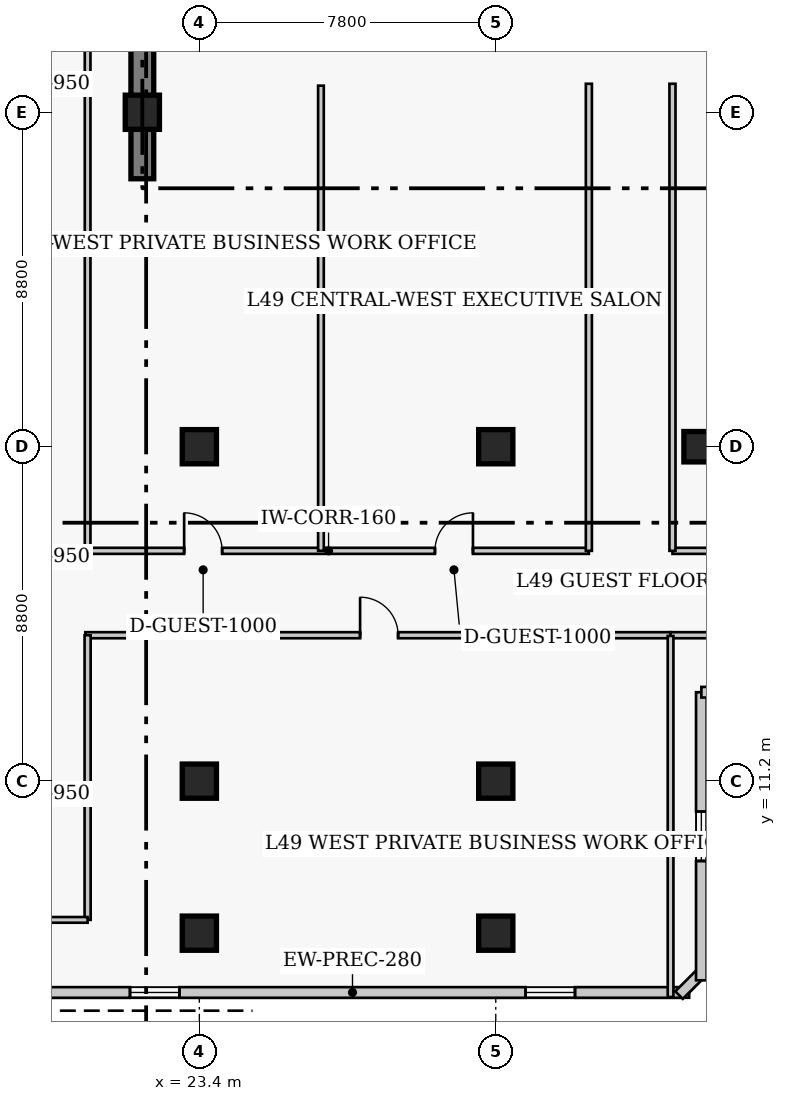
"""IFC4 building model, lengths in metres.
Left out: names, types, materials, properties, quantities, classifications, styles, units other than length and angle.
Written with IfcOpenShell. Run it as: python <this file> out.ifc"""

import sys

from ifc_helpers import new_model, si_unit, direction, frame, frame_2d, origin, origin_2d, place, context, subcontext, project, spatial, rectangle, extrude, element, fill, save


model = new_model("IFC4")
c1 = context("Model", 3, precision=1e-05, world=origin(), true_north=direction((0.0, 1.0)))
c2 = subcontext(c1, "Body", "Model", "MODEL_VIEW")
j1 = project(units=[si_unit("LENGTHUNIT", "METRE"), si_unit("PLANEANGLEUNIT", "RADIAN")], contexts=[c1])
p1 = place(None, origin())
s1 = spatial("IfcSite", under=j1, at=p1, CompositionType="ELEMENT")
p2 = place(p1, origin())
s2 = spatial("IfcBuilding", under=s1, at=p2, CompositionType="ELEMENT")
p3 = place(p2, frame((0.0, 0.0, 196.8)))
s3 = spatial("IfcBuildingStorey", under=s2, at=p3, CompositionType="ELEMENT", Elevation=196.8)
p4 = place(p3, frame((21.9, 27.05, 0.0), z_axis=(0.0, 0.0, 1.0), x_axis=(0.0, 1.0, 0.0)))
e1 = element("IfcWall", 1, at=p4, inside=s3, PredefinedType="SHEAR", context=c2, shape_type="SweptSolid", body=[
    extrude(rectangle(XDim=13.57, YDim=0.6, at=frame_2d((6.785, 0.0))), origin(), (0.0, 0.0, 1.0), 3.9),
])
for number, where, z_axis, x_axis in (
    (2, (23.4, 11.2, 0.0), (0.0, 0.0, 1.0), (1.0, 0.0, 0.0)),
    (3, (23.4, 20.0, 0.0), (0.0, 0.0, 1.0), (1.0, 0.0, 0.0)),
    (4, (31.2, 11.2, 0.0), (0.0, 0.0, 1.0), (1.0, 0.0, 0.0)),
    (5, (31.2, 20.0, 0.0), (0.0, 0.0, 1.0), (1.0, 0.0, 0.0)),
):
    element("IfcColumn", number, at=place(p3, frame(where, z_axis=z_axis, x_axis=x_axis)), inside=s3, PredefinedType="COLUMN", context=c2, shape_type="SweptSolid", body=[
        extrude(rectangle(XDim=0.9, YDim=0.9, at=origin_2d()), origin(), (0.0, 0.0, 1.0), 3.9),
    ])
p5 = place(p3, frame((36.75, 20.0, 0.0), z_axis=(0.0, 0.0, 1.0), x_axis=(1.0, 0.0, 0.0)))
e6 = element("IfcColumn", 6, at=p5, inside=s3, PredefinedType="COLUMN", context=c2, shape_type="SweptSolid", body=[
    extrude(rectangle(XDim=1.2, YDim=0.8, at=origin_2d()), origin(), (0.0, 0.0, 1.0), 3.9),
])
for number, where, z_axis, x_axis in (
    (7, (21.9, 28.8, 0.0), (0.0, 0.0, 1.0), (1.0, 0.0, 0.0)),
    (8, (23.4, 7.2, 0.0), (0.0, 0.0, 1.0), (1.0, 0.0, 0.0)),
    (9, (31.2, 7.2, 0.0), (0.0, 0.0, 1.0), (1.0, 0.0, 0.0)),
):
    element("IfcColumn", number, at=place(p3, frame(where, z_axis=z_axis, x_axis=x_axis)), inside=s3, PredefinedType="COLUMN", context=c2, shape_type="SweptSolid", body=[
        extrude(rectangle(XDim=0.9, YDim=0.9, at=origin_2d()), origin(), (0.0, 0.0, 1.0), 3.9),
    ])
p6 = place(p3, frame((10.46, 5.64, 0.0), z_axis=(0.0, 0.0, 1.0), x_axis=(1.0, 0.0, 0.0)))
e10 = element("IfcWall", 10, at=p6, inside=s3, PredefinedType="SOLIDWALL", context=c2, shape_type="SweptSolid", body=[
    extrude(rectangle(XDim=25.83, YDim=0.28, at=frame_2d((12.915, 0.0))), origin(), (0.0, 0.0, 1.0), 3.65),
])
p7 = place(p6, frame((4.305, 0.0, 0.85)))
e11 = element("IfcOpeningElement", 11, at=p7, cuts=e10, PredefinedType="OPENING", context=c2, shape_type="SweptSolid", body=[
    extrude(rectangle(XDim=1.3, YDim=1.7, at=frame_2d((0.65, 0.85))), frame((0.0, 0.15, 0.0), z_axis=(0.0, -1.0, 0.0), x_axis=(1.0, 0.0, 0.0)), (0.0, 0.0, 1.0), 0.3),
])
p8 = place(p6, frame((11.115, 0.0, 0.85)))
e12 = element("IfcOpeningElement", 12, at=p8, cuts=e10, PredefinedType="OPENING", context=c2, shape_type="SweptSolid", body=[
    extrude(rectangle(XDim=1.3, YDim=1.7, at=frame_2d((0.65, 0.85))), frame((0.0, 0.15, 0.0), z_axis=(0.0, -1.0, 0.0), x_axis=(1.0, 0.0, 0.0)), (0.0, 0.0, 1.0), 0.3),
])
p9 = place(p6, frame((21.525, 0.0, 0.85)))
e13 = element("IfcOpeningElement", 13, at=p9, cuts=e10, PredefinedType="OPENING", context=c2, shape_type="SweptSolid", body=[
    extrude(rectangle(XDim=1.3, YDim=1.7, at=frame_2d((0.65, 0.85))), frame((0.0, 0.15, 0.0), z_axis=(0.0, -1.0, 0.0), x_axis=(1.0, 0.0, 0.0)), (0.0, 0.0, 1.0), 0.3),
])
p10 = place(p3, frame((36.023, 5.571, 0.0), z_axis=(0.0, 0.0, 1.0), x_axis=(0.707106781187, 0.707106781187, 0.0)))
e14 = element("IfcWall", 14, at=p10, inside=s3, PredefinedType="SOLIDWALL", context=c2, shape_type="SweptSolid", body=[
    extrude(rectangle(XDim=0.928, YDim=0.28, at=frame_2d((0.464, 0.0))), origin(), (0.0, 0.0, 1.0), 3.65),
])
p11 = place(p3, frame((36.61, 5.96, 0.0), z_axis=(0.0, 0.0, 1.0), x_axis=(0.0, 1.0, 0.0)))
e15 = element("IfcWall", 15, at=p11, inside=s3, PredefinedType="SOLIDWALL", context=c2, shape_type="SweptSolid", body=[
    extrude(rectangle(XDim=7.58, YDim=0.28, at=frame_2d((3.79, 0.0))), origin(), (0.0, 0.0, 1.0), 3.65),
])
p12 = place(p11, frame((3.14, 0.0, 0.85)))
e16 = element("IfcOpeningElement", 16, at=p12, cuts=e15, PredefinedType="OPENING", context=c2, shape_type="SweptSolid", body=[
    extrude(rectangle(XDim=1.3, YDim=1.7, at=frame_2d((0.65, 0.85))), frame((0.0, 0.15, 0.0), z_axis=(0.0, -1.0, 0.0), x_axis=(1.0, 0.0, 0.0)), (0.0, 0.0, 1.0), 0.3),
])
p13 = place(p3, frame((36.61, 13.54, 0.0), z_axis=(0.0, 0.0, 1.0), x_axis=(1.0, 0.0, 0.0)))
e17 = element("IfcWall", 17, at=p13, inside=s3, PredefinedType="SOLIDWALL", context=c2, shape_type="SweptSolid", body=[
    extrude(rectangle(XDim=4.78, YDim=0.28, at=frame_2d((2.39, 0.0))), origin(), (0.0, 0.0, 1.0), 3.65),
])
p14 = place(p13, frame((1.74, 0.0, 0.85)))
e18 = element("IfcOpeningElement", 18, at=p14, cuts=e17, PredefinedType="OPENING", context=c2, shape_type="SweptSolid", body=[
    extrude(rectangle(XDim=1.3, YDim=1.7, at=frame_2d((0.65, 0.85))), frame((0.0, 0.15, 0.0), z_axis=(0.0, -1.0, 0.0), x_axis=(1.0, 0.0, 0.0)), (0.0, 0.0, 1.0), 0.3),
])
p15 = place(p3, frame((20.4, 17.26, 0.0), z_axis=(0.0, 0.0, 1.0), x_axis=(1.0, 0.0, 0.0)))
e19 = element("IfcWall", 19, at=p15, inside=s3, PredefinedType="PARTITIONING", context=c2, shape_type="SweptSolid", body=[
    extrude(rectangle(XDim=13.25, YDim=0.16, at=frame_2d((6.625, 0.0))), origin(), (0.0, 0.0, 1.0), 3.65),
])
p16 = place(p15, frame((2.6, 0.0, 0.0)))
e20 = element("IfcOpeningElement", 20, at=p16, cuts=e19, PredefinedType="OPENING", context=c2, shape_type="SweptSolid", body=[
    extrude(rectangle(XDim=1.0, YDim=2.15, at=frame_2d((0.5, 1.075))), frame((0.0, 0.09, 0.0), z_axis=(0.0, -1.0, 0.0), x_axis=(1.0, 0.0, 0.0)), (0.0, 0.0, 1.0), 0.18),
])
p17 = place(p15, frame((9.2, 0.0, 0.0)))
e21 = element("IfcOpeningElement", 21, at=p17, cuts=e19, PredefinedType="OPENING", context=c2, shape_type="SweptSolid", body=[
    extrude(rectangle(XDim=1.0, YDim=2.15, at=frame_2d((0.5, 1.075))), frame((0.0, 0.09, 0.0), z_axis=(0.0, -1.0, 0.0), x_axis=(1.0, 0.0, 0.0)), (0.0, 0.0, 1.0), 0.18),
])
p18 = place(p3, frame((35.85, 17.26, 0.0), z_axis=(0.0, 0.0, 1.0), x_axis=(1.0, 0.0, 0.0)))
e22 = element("IfcWall", 22, at=p18, inside=s3, PredefinedType="PARTITIONING", context=c2, shape_type="SweptSolid", body=[
    extrude(rectangle(XDim=23.35, YDim=0.16, at=frame_2d((11.675, 0.0))), origin(), (0.0, 0.0, 1.0), 3.65),
])
p19 = place(p18, frame((8.95, 0.0, 0.0)))
e23 = element("IfcOpeningElement", 23, at=p19, cuts=e22, PredefinedType="OPENING", context=c2, shape_type="SweptSolid", body=[
    extrude(rectangle(XDim=1.0, YDim=2.15, at=frame_2d((0.5, 1.075))), frame((0.0, 0.09, 0.0), z_axis=(0.0, -1.0, 0.0), x_axis=(1.0, 0.0, 0.0)), (0.0, 0.0, 1.0), 0.18),
])
p20 = place(p18, frame((17.625, 0.0, 0.0)))
e24 = element("IfcOpeningElement", 24, at=p20, cuts=e22, PredefinedType="OPENING", context=c2, shape_type="SweptSolid", body=[
    extrude(rectangle(XDim=1.0, YDim=2.15, at=frame_2d((0.5, 1.075))), frame((0.0, 0.09, 0.0), z_axis=(0.0, -1.0, 0.0), x_axis=(1.0, 0.0, 0.0)), (0.0, 0.0, 1.0), 0.18),
])
for number, where, z_axis, x_axis in (
    (25, (33.65, 17.26, 0.0), (0.0, 0.0, 1.0), (0.0, 1.0, 0.0)),
    (26, (35.85, 17.26, 0.0), (0.0, 0.0, 1.0), (0.0, 1.0, 0.0)),
):
    element("IfcWall", number, at=place(p3, frame(where, z_axis=z_axis, x_axis=x_axis)), inside=s3, PredefinedType="PARTITIONING", context=c2, shape_type="SweptSolid", body=[
        extrude(rectangle(XDim=12.29, YDim=0.16, at=frame_2d((6.145, 0.0))), origin(), (0.0, 0.0, 1.0), 3.65),
    ])
p21 = place(p3, frame((20.4, 15.04, 0.0), z_axis=(0.0, 0.0, 1.0), x_axis=(1.0, 0.0, 0.0)))
e27 = element("IfcWall", 27, at=p21, inside=s3, PredefinedType="PARTITIONING", context=c2, shape_type="SweptSolid", body=[
    extrude(rectangle(XDim=15.4, YDim=0.16, at=frame_2d((7.7, 0.0))), origin(), (0.0, 0.0, 1.0), 3.65),
])
p22 = place(p21, frame((7.23, 0.0, 0.0)))
e28 = element("IfcOpeningElement", 28, at=p22, cuts=e27, PredefinedType="OPENING", context=c2, shape_type="SweptSolid", body=[
    extrude(rectangle(XDim=1.0, YDim=2.15, at=frame_2d((0.5, 1.075))), frame((0.0, 0.09, 0.0), z_axis=(0.0, -1.0, 0.0), x_axis=(1.0, 0.0, 0.0)), (0.0, 0.0, 1.0), 0.18),
])
p23 = place(p3, frame((35.8, 15.04, 0.0), z_axis=(0.0, 0.0, 1.0), x_axis=(1.0, 0.0, 0.0)))
e29 = element("IfcWall", 29, at=p23, inside=s3, PredefinedType="PARTITIONING", context=c2, shape_type="SweptSolid", body=[
    extrude(rectangle(XDim=23.4, YDim=0.16, at=frame_2d((11.7, 0.0))), origin(), (0.0, 0.0, 1.0), 3.65),
])
p24 = place(p23, frame((11.25, 0.0, 0.0)))
e30 = element("IfcOpeningElement", 30, at=p24, cuts=e29, PredefinedType="OPENING", context=c2, shape_type="SweptSolid", body=[
    extrude(rectangle(XDim=0.95, YDim=2.1, at=frame_2d((0.475, 1.05))), frame((0.0, 0.09, 0.0), z_axis=(0.0, -1.0, 0.0), x_axis=(1.0, 0.0, 0.0)), (0.0, 0.0, 1.0), 0.18),
])
p25 = place(p23, frame((18.4, 0.0, 0.0)))
e31 = element("IfcOpeningElement", 31, at=p25, cuts=e29, PredefinedType="OPENING", context=c2, shape_type="SweptSolid", body=[
    extrude(rectangle(XDim=1.0, YDim=2.15, at=frame_2d((0.5, 1.075))), frame((0.0, 0.09, 0.0), z_axis=(0.0, -1.0, 0.0), x_axis=(1.0, 0.0, 0.0)), (0.0, 0.0, 1.0), 0.18),
])
p26 = place(p3, frame((20.46, 7.55, 0.0), z_axis=(0.0, 0.0, 1.0), x_axis=(0.0, 1.0, 0.0)))
e32 = element("IfcWall", 32, at=p26, inside=s3, PredefinedType="PARTITIONING", context=c2, shape_type="SweptSolid", body=[
    extrude(rectangle(XDim=7.49, YDim=0.16, at=frame_2d((3.745, 0.0))), origin(), (0.0, 0.0, 1.0), 3.65),
])
p27 = place(p3, frame((18.24, 7.55, 0.0), z_axis=(0.0, 0.0, 1.0), x_axis=(1.0, 0.0, 0.0)))
e33 = element("IfcWall", 33, at=p27, inside=s3, PredefinedType="PARTITIONING", context=c2, shape_type="SweptSolid", body=[
    extrude(rectangle(XDim=2.22, YDim=0.15, at=frame_2d((1.11, 0.0))), origin(), (0.0, 0.0, 1.0), 3.65),
])
p28 = place(p3, frame((20.46, 17.26, 0.0), z_axis=(0.0, 0.0, 1.0), x_axis=(0.0, 1.0, 0.0)))
e34 = element("IfcWall", 34, at=p28, inside=s3, PredefinedType="PARTITIONING", context=c2, shape_type="SweptSolid", body=[
    extrude(rectangle(XDim=15.54, YDim=0.15, at=frame_2d((7.77, 0.0))), origin(), (0.0, 0.0, 1.0), 3.65),
])
p29 = place(p3, frame((26.6, 17.26, 0.0), z_axis=(0.0, 0.0, 1.0), x_axis=(0.0, 1.0, 0.0)))
e35 = element("IfcWall", 35, at=p29, inside=s3, PredefinedType="PARTITIONING", context=c2, shape_type="SweptSolid", body=[
    extrude(rectangle(XDim=12.24, YDim=0.15, at=frame_2d((6.12, 0.0))), origin(), (0.0, 0.0, 1.0), 3.65),
])
p30 = place(p3, frame((35.8, 5.52, 0.0), z_axis=(0.0, 0.0, 1.0), x_axis=(0.0, 1.0, 0.0)))
e36 = element("IfcWall", 36, at=p30, inside=s3, PredefinedType="PARTITIONING", context=c2, shape_type="SweptSolid", body=[
    extrude(rectangle(XDim=9.5, YDim=0.15, at=frame_2d((4.75, 0.0))), origin(), (0.0, 0.0, 1.0), 3.65),
])
p31 = place(p8, origin())
e37 = element("IfcWindow", 37, at=p31, inside=s3, PartitioningType="SINGLE_PANEL", PredefinedType="WINDOW", context=c2, shape_type="SweptSolid", body=[
    extrude(rectangle(XDim=1.3, YDim=1.7, at=frame_2d((0.65, 0.85))), frame((0.0, 0.03, 0.0), z_axis=(0.0, -1.0, 0.0), x_axis=(1.0, 0.0, 0.0)), (0.0, 0.0, 1.0), 0.06),
])
fill(e12, e37)
p32 = place(p9, origin())
e38 = element("IfcWindow", 38, at=p32, inside=s3, PartitioningType="SINGLE_PANEL", PredefinedType="WINDOW", context=c2, shape_type="SweptSolid", body=[
    extrude(rectangle(XDim=1.3, YDim=1.7, at=frame_2d((0.65, 0.85))), frame((0.0, 0.03, 0.0), z_axis=(0.0, -1.0, 0.0), x_axis=(1.0, 0.0, 0.0)), (0.0, 0.0, 1.0), 0.06),
])
fill(e13, e38)
p33 = place(p12, origin())
e39 = element("IfcWindow", 39, at=p33, inside=s3, PartitioningType="SINGLE_PANEL", PredefinedType="WINDOW", context=c2, shape_type="SweptSolid", body=[
    extrude(rectangle(XDim=1.3, YDim=1.7, at=frame_2d((0.65, 0.85))), frame((0.0, 0.03, 0.0), z_axis=(0.0, -1.0, 0.0), x_axis=(1.0, 0.0, 0.0)), (0.0, 0.0, 1.0), 0.06),
])
fill(e16, e39)
p34 = place(p16, origin())
e40 = element("IfcDoor", 40, at=p34, inside=s3, OperationType="SINGLE_SWING_LEFT", PredefinedType="DOOR", context=c2, shape_type="SweptSolid", body=[
    extrude(rectangle(XDim=1.0, YDim=2.15, at=frame_2d((0.5, 1.075))), frame((0.0, 0.025, 0.0), z_axis=(0.0, -1.0, 0.0), x_axis=(1.0, 0.0, 0.0)), (0.0, 0.0, 1.0), 0.05),
])
fill(e20, e40)
p35 = place(p17, origin())
e41 = element("IfcDoor", 41, at=p35, inside=s3, OperationType="SINGLE_SWING_RIGHT", PredefinedType="DOOR", context=c2, shape_type="SweptSolid", body=[
    extrude(rectangle(XDim=1.0, YDim=2.15, at=frame_2d((0.5, 1.075))), frame((0.0, 0.025, 0.0), z_axis=(0.0, -1.0, 0.0), x_axis=(1.0, 0.0, 0.0)), (0.0, 0.0, 1.0), 0.05),
])
fill(e21, e41)
p36 = place(p22, origin())
e42 = element("IfcDoor", 42, at=p36, inside=s3, OperationType="SINGLE_SWING_LEFT", PredefinedType="DOOR", context=c2, shape_type="SweptSolid", body=[
    extrude(rectangle(XDim=1.0, YDim=2.15, at=frame_2d((0.5, 1.075))), frame((0.0, 0.025, 0.0), z_axis=(0.0, -1.0, 0.0), x_axis=(1.0, 0.0, 0.0)), (0.0, 0.0, 1.0), 0.05),
])
fill(e28, e42)
save(model, sys.argv[1])
